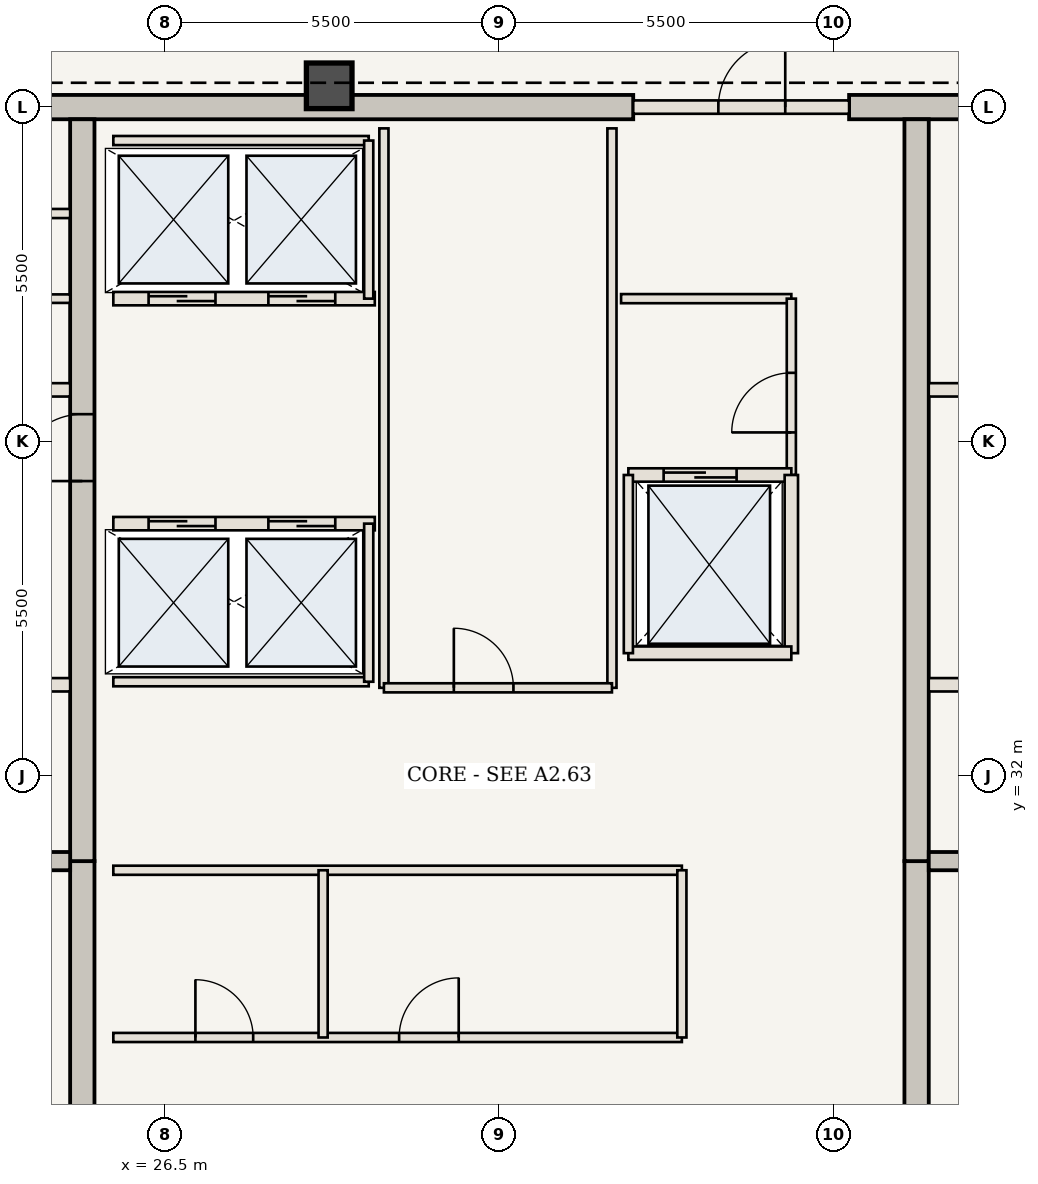
"""IFC4 building model, lengths in metres.
Left out: names, types, materials, properties, quantities, classifications, styles, units other than length and angle.
Written with IfcOpenShell. Run it as: python <this file> out.ifc"""

import sys

from ifc_helpers import new_model, si_unit, direction, frame, frame_2d, origin, origin_2d, place, context, subcontext, project, spatial, rectangle, extrude, element, fill, save


model = new_model("IFC4")
c1 = context("Model", 3, precision=1e-05, world=origin(), true_north=direction((0.0, 1.0)))
c2 = subcontext(c1, "Body", "Model", "MODEL_VIEW")
j1 = project(units=[si_unit("LENGTHUNIT", "METRE"), si_unit("PLANEANGLEUNIT", "RADIAN")], contexts=[c1])
p1 = place(None, origin())
s1 = spatial("IfcSite", under=j1, at=p1, CompositionType="ELEMENT")
p2 = place(p1, origin())
s2 = spatial("IfcBuilding", under=s1, at=p2, CompositionType="ELEMENT")
p3 = place(p2, frame((0.0, 0.0, 292.95)))
s3 = spatial("IfcBuildingStorey", under=s2, at=p3, CompositionType="ELEMENT", Elevation=292.95)
p4 = place(p3, frame((21.41, 43.0, 0.0), z_axis=(0.0, 0.0, 1.0), x_axis=(1.0, 0.0, 0.0)))
e1 = element("IfcWall", 1, at=p4, inside=s3, PredefinedType="SHEAR", context=c2, shape_type="SweptSolid", body=[
    extrude(rectangle(XDim=12.79, YDim=0.4, at=frame_2d((6.395, 0.0))), origin(), (0.0, 0.0, 1.0), 3.85),
])
p5 = place(p3, frame((37.75, 43.0, 0.0), z_axis=(0.0, 0.0, 1.0), x_axis=(1.0, 0.0, 0.0)))
e2 = element("IfcWall", 2, at=p5, inside=s3, PredefinedType="SHEAR", context=c2, shape_type="SweptSolid", body=[
    extrude(rectangle(XDim=4.84, YDim=0.4, at=frame_2d((2.42, 0.0))), origin(), (0.0, 0.0, 1.0), 3.85),
])
p6 = place(p3, frame((25.14, 21.15, 0.0), z_axis=(0.0, 0.0, 1.0), x_axis=(0.0, 1.0, 0.0)))
e3 = element("IfcWall", 3, at=p6, inside=s3, PredefinedType="SHEAR", context=c2, shape_type="SweptSolid", body=[
    extrude(rectangle(XDim=9.45, YDim=0.4, at=frame_2d((4.725, 0.0))), origin(), (0.0, 0.0, 1.0), 3.85),
])
p7 = place(p3, frame((25.14, 30.6, 0.0), z_axis=(0.0, 0.0, 1.0), x_axis=(0.0, 1.0, 0.0)))
e4 = element("IfcWall", 4, at=p7, inside=s3, PredefinedType="SHEAR", context=c2, shape_type="SweptSolid", body=[
    extrude(rectangle(XDim=12.2, YDim=0.4, at=frame_2d((6.1, 0.0))), origin(), (0.0, 0.0, 1.0), 3.85),
])
p8 = place(p7, frame((6.25, 0.0, 0.0)))
e5 = element("IfcOpeningElement", 5, at=p8, cuts=e4, PredefinedType="OPENING", context=c2, shape_type="SweptSolid", body=[
    extrude(rectangle(XDim=1.1, YDim=2.15, at=frame_2d((0.55, 1.075))), frame((0.0, 0.21, 0.0), z_axis=(0.0, -1.0, 0.0), x_axis=(1.0, 0.0, 0.0)), (0.0, 0.0, 1.0), 0.42),
])
p9 = place(p3, frame((38.86, 21.15, 0.0), z_axis=(0.0, 0.0, 1.0), x_axis=(0.0, 1.0, 0.0)))
e6 = element("IfcWall", 6, at=p9, inside=s3, PredefinedType="SHEAR", context=c2, shape_type="SweptSolid", body=[
    extrude(rectangle(XDim=9.45, YDim=0.4, at=frame_2d((4.725, 0.0))), origin(), (0.0, 0.0, 1.0), 3.85),
])
p10 = place(p3, frame((38.86, 30.6, 0.0), z_axis=(0.0, 0.0, 1.0), x_axis=(0.0, 1.0, 0.0)))
e7 = element("IfcWall", 7, at=p10, inside=s3, PredefinedType="SHEAR", context=c2, shape_type="SweptSolid", body=[
    extrude(rectangle(XDim=12.2, YDim=0.4, at=frame_2d((6.1, 0.0))), origin(), (0.0, 0.0, 1.0), 3.85),
])
p11 = place(p3, frame((29.2, 43.35, 0.0), z_axis=(0.0, 0.0, 1.0), x_axis=(1.0, 0.0, 0.0)))
e8 = element("IfcColumn", 8, at=p11, inside=s3, PredefinedType="COLUMN", context=c2, shape_type="SweptSolid", body=[
    extrude(rectangle(XDim=0.75, YDim=0.75, at=origin_2d()), origin(), (0.0, 0.0, 1.0), 3.85),
])
for number, where, z_axis, x_axis in (
    (9, (21.41, 30.6, 0.0), (0.0, 0.0, 1.0), (1.0, 0.0, 0.0)),
    (10, (39.06, 30.6, 0.0), (0.0, 0.0, 1.0), (1.0, 0.0, 0.0)),
):
    element("IfcWall", number, at=place(p3, frame(where, z_axis=z_axis, x_axis=x_axis)), inside=s3, PredefinedType="SHEAR", context=c2, shape_type="SweptSolid", body=[
        extrude(rectangle(XDim=3.53, YDim=0.3, at=frame_2d((1.765, 0.0))), origin(), (0.0, 0.0, 1.0), 3.685),
    ])
p12 = place(p3, frame((21.41, 33.5, 0.0), z_axis=(0.0, 0.0, 1.0), x_axis=(1.0, 0.0, 0.0)))
e11 = element("IfcWall", 11, at=p12, inside=s3, PredefinedType="STANDARD", context=c2, shape_type="SweptSolid", body=[
    extrude(rectangle(XDim=3.53, YDim=0.22, at=frame_2d((1.765, 0.0))), origin(), (0.0, 0.0, 1.0), 3.685),
])
p13 = place(p12, frame((0.75, 0.0, 0.0)))
e12 = element("IfcOpeningElement", 12, at=p13, cuts=e11, PredefinedType="OPENING", context=c2, shape_type="SweptSolid", body=[
    extrude(rectangle(XDim=1.2, YDim=2.2, at=frame_2d((0.6, 1.1))), frame((0.0, 0.12, 0.0), z_axis=(0.0, -1.0, 0.0), x_axis=(1.0, 0.0, 0.0)), (0.0, 0.0, 1.0), 0.24),
])
p14 = place(p3, frame((39.06, 33.5, 0.0), z_axis=(0.0, 0.0, 1.0), x_axis=(1.0, 0.0, 0.0)))
e13 = element("IfcWall", 13, at=p14, inside=s3, PredefinedType="STANDARD", context=c2, shape_type="SweptSolid", body=[
    extrude(rectangle(XDim=3.53, YDim=0.22, at=frame_2d((1.765, 0.0))), origin(), (0.0, 0.0, 1.0), 3.685),
])
p15 = place(p14, frame((1.55, 0.0, 0.0)))
e14 = element("IfcOpeningElement", 14, at=p15, cuts=e13, PredefinedType="OPENING", context=c2, shape_type="SweptSolid", body=[
    extrude(rectangle(XDim=1.2, YDim=2.2, at=frame_2d((0.6, 1.1))), frame((0.0, 0.12, 0.0), z_axis=(0.0, -1.0, 0.0), x_axis=(1.0, 0.0, 0.0)), (0.0, 0.0, 1.0), 0.24),
])
for number, where, z_axis, x_axis in (
    (15, (21.41, 38.35, 0.0), (0.0, 0.0, 1.0), (1.0, 0.0, 0.0)),
    (16, (39.06, 38.35, 0.0), (0.0, 0.0, 1.0), (1.0, 0.0, 0.0)),
):
    element("IfcWall", number, at=place(p3, frame(where, z_axis=z_axis, x_axis=x_axis)), inside=s3, PredefinedType="STANDARD", context=c2, shape_type="SweptSolid", body=[
        extrude(rectangle(XDim=3.53, YDim=0.22, at=frame_2d((1.765, 0.0))), origin(), (0.0, 0.0, 1.0), 3.685),
    ])
p16 = place(p3, frame((21.41, 39.85, 0.0), z_axis=(0.0, 0.0, 1.0), x_axis=(1.0, 0.0, 0.0)))
e17 = element("IfcWall", 17, at=p16, inside=s3, PredefinedType="STANDARD", context=c2, shape_type="SweptSolid", body=[
    extrude(rectangle(XDim=3.53, YDim=0.14, at=frame_2d((1.765, 0.0))), origin(), (0.0, 0.0, 1.0), 3.685),
])
p17 = place(p3, frame((21.41, 41.25, 0.0), z_axis=(0.0, 0.0, 1.0), x_axis=(1.0, 0.0, 0.0)))
e18 = element("IfcWall", 18, at=p17, inside=s3, PredefinedType="STANDARD", context=c2, shape_type="SweptSolid", body=[
    extrude(rectangle(XDim=3.53, YDim=0.15, at=frame_2d((1.765, 0.0))), origin(), (0.0, 0.0, 1.0), 3.685),
])
p18 = place(p3, frame((34.0, 39.85, 0.0), z_axis=(0.0, 0.0, 1.0), x_axis=(1.0, 0.0, 0.0)))
e19 = element("IfcWall", 19, at=p18, inside=s3, PredefinedType="STANDARD", context=c2, shape_type="SweptSolid", body=[
    extrude(rectangle(XDim=2.8, YDim=0.15, at=frame_2d((1.4, 0.0))), origin(), (0.0, 0.0, 1.0), 3.685),
])
p19 = place(p3, frame((36.8, 36.95, 0.0), z_axis=(0.0, 0.0, 1.0), x_axis=(0.0, 1.0, 0.0)))
e20 = element("IfcWall", 20, at=p19, inside=s3, PredefinedType="STANDARD", context=c2, shape_type="SweptSolid", body=[
    extrude(rectangle(XDim=2.9, YDim=0.15, at=frame_2d((1.45, 0.0))), origin(), (0.0, 0.0, 1.0), 3.685),
])
p20 = place(p19, frame((0.7, 0.0, 0.0)))
e21 = element("IfcOpeningElement", 21, at=p20, cuts=e20, PredefinedType="OPENING", context=c2, shape_type="SweptSolid", body=[
    extrude(rectangle(XDim=0.98, YDim=2.2, at=frame_2d((0.49, 1.1))), frame((0.0, 0.085, 0.0), z_axis=(0.0, -1.0, 0.0), x_axis=(1.0, 0.0, 0.0)), (0.0, 0.0, 1.0), 0.17),
])
p21 = place(p3, frame((25.65, 27.7, 0.0), z_axis=(0.0, 0.0, 1.0), x_axis=(1.0, 0.0, 0.0)))
e22 = element("IfcWall", 22, at=p21, inside=s3, PredefinedType="STANDARD", context=c2, shape_type="SweptSolid", body=[
    extrude(rectangle(XDim=9.35, YDim=0.15, at=frame_2d((4.675, 0.0))), origin(), (0.0, 0.0, 1.0), 3.685),
])
p22 = place(p21, frame((1.35, 0.0, 0.0)))
e23 = element("IfcOpeningElement", 23, at=p22, cuts=e22, PredefinedType="OPENING", context=c2, shape_type="SweptSolid", body=[
    extrude(rectangle(XDim=0.95, YDim=2.15, at=frame_2d((0.475, 1.075))), frame((0.0, 0.085, 0.0), z_axis=(0.0, -1.0, 0.0), x_axis=(1.0, 0.0, 0.0)), (0.0, 0.0, 1.0), 0.17),
])
p23 = place(p21, frame((4.7, 0.0, 0.0)))
e24 = element("IfcOpeningElement", 24, at=p23, cuts=e22, PredefinedType="OPENING", context=c2, shape_type="SweptSolid", body=[
    extrude(rectangle(XDim=0.98, YDim=2.2, at=frame_2d((0.49, 1.1))), frame((0.0, 0.085, 0.0), z_axis=(0.0, -1.0, 0.0), x_axis=(1.0, 0.0, 0.0)), (0.0, 0.0, 1.0), 0.17),
])
p24 = place(p3, frame((25.65, 30.45, 0.0), z_axis=(0.0, 0.0, 1.0), x_axis=(1.0, 0.0, 0.0)))
e25 = element("IfcWall", 25, at=p24, inside=s3, PredefinedType="STANDARD", context=c2, shape_type="SweptSolid", body=[
    extrude(rectangle(XDim=9.35, YDim=0.15, at=frame_2d((4.675, 0.0))), origin(), (0.0, 0.0, 1.0), 3.685),
])
for number, where, z_axis, x_axis in (
    (26, (29.1, 27.7, 0.0), (0.0, 0.0, 1.0), (0.0, 1.0, 0.0)),
    (27, (35.0, 27.7, 0.0), (0.0, 0.0, 1.0), (0.0, 1.0, 0.0)),
):
    element("IfcWall", number, at=place(p3, frame(where, z_axis=z_axis, x_axis=x_axis)), inside=s3, PredefinedType="STANDARD", context=c2, shape_type="SweptSolid", body=[
        extrude(rectangle(XDim=2.75, YDim=0.15, at=frame_2d((1.375, 0.0))), origin(), (0.0, 0.0, 1.0), 3.685),
    ])
p25 = place(p3, frame((25.65, 36.15, 0.0), z_axis=(0.0, 0.0, 1.0), x_axis=(1.0, 0.0, 0.0)))
e28 = element("IfcWall", 28, at=p25, inside=s3, PredefinedType="STANDARD", context=c2, shape_type="SweptSolid", body=[
    extrude(rectangle(XDim=4.3, YDim=0.22, at=frame_2d((2.15, 0.0))), origin(), (0.0, 0.0, 1.0), 3.685),
])
p26 = place(p25, frame((0.58, 0.0, 0.0)))
e29 = element("IfcOpeningElement", 29, at=p26, cuts=e28, PredefinedType="OPENING", context=c2, shape_type="SweptSolid", body=[
    extrude(rectangle(XDim=1.1, YDim=2.15, at=frame_2d((0.55, 1.075))), frame((0.0, 0.12, 0.0), z_axis=(0.0, -1.0, 0.0), x_axis=(1.0, 0.0, 0.0)), (0.0, 0.0, 1.0), 0.24),
])
p27 = place(p25, frame((2.55, 0.0, 0.0)))
e30 = element("IfcOpeningElement", 30, at=p27, cuts=e28, PredefinedType="OPENING", context=c2, shape_type="SweptSolid", body=[
    extrude(rectangle(XDim=1.1, YDim=2.15, at=frame_2d((0.55, 1.075))), frame((0.0, 0.12, 0.0), z_axis=(0.0, -1.0, 0.0), x_axis=(1.0, 0.0, 0.0)), (0.0, 0.0, 1.0), 0.24),
])
p28 = place(p3, frame((25.65, 33.55, 0.0), z_axis=(0.0, 0.0, 1.0), x_axis=(1.0, 0.0, 0.0)))
e31 = element("IfcWall", 31, at=p28, inside=s3, PredefinedType="STANDARD", context=c2, shape_type="SweptSolid", body=[
    extrude(rectangle(XDim=4.2, YDim=0.15, at=frame_2d((2.1, 0.0))), origin(), (0.0, 0.0, 1.0), 3.685),
])
p29 = place(p3, frame((29.85, 33.55, 0.0), z_axis=(0.0, 0.0, 1.0), x_axis=(0.0, 1.0, 0.0)))
e32 = element("IfcWall", 32, at=p29, inside=s3, PredefinedType="STANDARD", context=c2, shape_type="SweptSolid", body=[
    extrude(rectangle(XDim=2.6, YDim=0.15, at=frame_2d((1.3, 0.0))), origin(), (0.0, 0.0, 1.0), 3.685),
])
p30 = place(p3, frame((25.65, 39.85, 0.0), z_axis=(0.0, 0.0, 1.0), x_axis=(1.0, 0.0, 0.0)))
e33 = element("IfcWall", 33, at=p30, inside=s3, PredefinedType="STANDARD", context=c2, shape_type="SweptSolid", body=[
    extrude(rectangle(XDim=4.3, YDim=0.22, at=frame_2d((2.15, 0.0))), origin(), (0.0, 0.0, 1.0), 3.685),
])
p31 = place(p30, frame((0.58, 0.0, 0.0)))
e34 = element("IfcOpeningElement", 34, at=p31, cuts=e33, PredefinedType="OPENING", context=c2, shape_type="SweptSolid", body=[
    extrude(rectangle(XDim=1.1, YDim=2.15, at=frame_2d((0.55, 1.075))), frame((0.0, 0.12, 0.0), z_axis=(0.0, -1.0, 0.0), x_axis=(1.0, 0.0, 0.0)), (0.0, 0.0, 1.0), 0.24),
])
p32 = place(p30, frame((2.55, 0.0, 0.0)))
e35 = element("IfcOpeningElement", 35, at=p32, cuts=e33, PredefinedType="OPENING", context=c2, shape_type="SweptSolid", body=[
    extrude(rectangle(XDim=1.1, YDim=2.15, at=frame_2d((0.55, 1.075))), frame((0.0, 0.12, 0.0), z_axis=(0.0, -1.0, 0.0), x_axis=(1.0, 0.0, 0.0)), (0.0, 0.0, 1.0), 0.24),
])
p33 = place(p3, frame((25.65, 42.45, 0.0), z_axis=(0.0, 0.0, 1.0), x_axis=(1.0, 0.0, 0.0)))
e36 = element("IfcWall", 36, at=p33, inside=s3, PredefinedType="STANDARD", context=c2, shape_type="SweptSolid", body=[
    extrude(rectangle(XDim=4.2, YDim=0.15, at=frame_2d((2.1, 0.0))), origin(), (0.0, 0.0, 1.0), 3.685),
])
p34 = place(p3, frame((29.85, 39.85, 0.0), z_axis=(0.0, 0.0, 1.0), x_axis=(0.0, 1.0, 0.0)))
e37 = element("IfcWall", 37, at=p34, inside=s3, PredefinedType="STANDARD", context=c2, shape_type="SweptSolid", body=[
    extrude(rectangle(XDim=2.6, YDim=0.15, at=frame_2d((1.3, 0.0))), origin(), (0.0, 0.0, 1.0), 3.685),
])
for number, where, z_axis, x_axis in (
    (38, (30.1, 33.45, 0.0), (0.0, 0.0, 1.0), (0.0, 1.0, 0.0)),
    (39, (33.85, 33.45, 0.0), (0.0, 0.0, 1.0), (0.0, 1.0, 0.0)),
):
    element("IfcWall", number, at=place(p3, frame(where, z_axis=z_axis, x_axis=x_axis)), inside=s3, PredefinedType="STANDARD", context=c2, shape_type="SweptSolid", body=[
        extrude(rectangle(XDim=9.2, YDim=0.15, at=frame_2d((4.6, 0.0))), origin(), (0.0, 0.0, 1.0), 3.685),
    ])
p35 = place(p3, frame((30.1, 33.45, 0.0), z_axis=(0.0, 0.0, 1.0), x_axis=(1.0, 0.0, 0.0)))
e40 = element("IfcWall", 40, at=p35, inside=s3, PredefinedType="STANDARD", context=c2, shape_type="SweptSolid", body=[
    extrude(rectangle(XDim=3.75, YDim=0.15, at=frame_2d((1.875, 0.0))), origin(), (0.0, 0.0, 1.0), 3.685),
])
p36 = place(p35, frame((1.15, 0.0, 0.0)))
e41 = element("IfcOpeningElement", 41, at=p36, cuts=e40, PredefinedType="OPENING", context=c2, shape_type="SweptSolid", body=[
    extrude(rectangle(XDim=0.98, YDim=2.2, at=frame_2d((0.49, 1.1))), frame((0.0, 0.085, 0.0), z_axis=(0.0, -1.0, 0.0), x_axis=(1.0, 0.0, 0.0)), (0.0, 0.0, 1.0), 0.17),
])
p37 = place(p3, frame((34.2, 43.0, 0.0), z_axis=(0.0, 0.0, 1.0), x_axis=(1.0, 0.0, 0.0)))
e42 = element("IfcWall", 42, at=p37, inside=s3, PredefinedType="STANDARD", context=c2, shape_type="SweptSolid", body=[
    extrude(rectangle(XDim=3.55, YDim=0.22, at=frame_2d((1.775, 0.0))), origin(), (0.0, 0.0, 1.0), 3.685),
])
p38 = place(p37, frame((1.4, 0.0, 0.0)))
e43 = element("IfcOpeningElement", 43, at=p38, cuts=e42, PredefinedType="OPENING", context=c2, shape_type="SweptSolid", body=[
    extrude(rectangle(XDim=1.1, YDim=2.15, at=frame_2d((0.55, 1.075))), frame((0.0, 0.12, 0.0), z_axis=(0.0, -1.0, 0.0), x_axis=(1.0, 0.0, 0.0)), (0.0, 0.0, 1.0), 0.24),
])
p39 = place(p3, frame((34.12, 36.95, 0.0), z_axis=(0.0, 0.0, 1.0), x_axis=(1.0, 0.0, 0.0)))
e44 = element("IfcWall", 44, at=p39, inside=s3, PredefinedType="STANDARD", context=c2, shape_type="SweptSolid", body=[
    extrude(rectangle(XDim=2.68, YDim=0.22, at=frame_2d((1.34, 0.0))), origin(), (0.0, 0.0, 1.0), 3.685),
])
p40 = place(p39, frame((0.58, 0.0, 0.0)))
e45 = element("IfcOpeningElement", 45, at=p40, cuts=e44, PredefinedType="OPENING", context=c2, shape_type="SweptSolid", body=[
    extrude(rectangle(XDim=1.2, YDim=2.2, at=frame_2d((0.6, 1.1))), frame((0.0, 0.12, 0.0), z_axis=(0.0, -1.0, 0.0), x_axis=(1.0, 0.0, 0.0)), (0.0, 0.0, 1.0), 0.24),
])
p41 = place(p3, frame((36.8, 34.02, 0.0), z_axis=(0.0, 0.0, 1.0), x_axis=(0.0, 1.0, 0.0)))
e46 = element("IfcWall", 46, at=p41, inside=s3, PredefinedType="STANDARD", context=c2, shape_type="SweptSolid", body=[
    extrude(rectangle(XDim=2.93, YDim=0.22, at=frame_2d((1.465, 0.0))), origin(), (0.0, 0.0, 1.0), 3.685),
])
p42 = place(p3, frame((34.12, 34.02, 0.0), z_axis=(0.0, 0.0, 1.0), x_axis=(1.0, 0.0, 0.0)))
e47 = element("IfcWall", 47, at=p42, inside=s3, PredefinedType="STANDARD", context=c2, shape_type="SweptSolid", body=[
    extrude(rectangle(XDim=2.68, YDim=0.22, at=frame_2d((1.34, 0.0))), origin(), (0.0, 0.0, 1.0), 3.685),
])
p43 = place(p3, frame((34.12, 34.02, 0.0), z_axis=(0.0, 0.0, 1.0), x_axis=(0.0, 1.0, 0.0)))
e48 = element("IfcWall", 48, at=p43, inside=s3, PredefinedType="STANDARD", context=c2, shape_type="SweptSolid", body=[
    extrude(rectangle(XDim=2.93, YDim=0.15, at=frame_2d((1.465, 0.0))), origin(), (0.0, 0.0, 1.0), 3.685),
])
p44 = place(p8, origin())
e49 = element("IfcDoor", 49, at=p44, inside=s3, OperationType="SINGLE_SWING_LEFT", PredefinedType="DOOR", context=c2, shape_type="SweptSolid", body=[
    extrude(rectangle(XDim=1.1, YDim=2.15, at=frame_2d((0.55, 1.075))), frame((0.0, 0.025, 0.0), z_axis=(0.0, -1.0, 0.0), x_axis=(1.0, 0.0, 0.0)), (0.0, 0.0, 1.0), 0.05),
])
fill(e5, e49)
p45 = place(p20, origin())
e50 = element("IfcDoor", 50, at=p45, inside=s3, OperationType="SINGLE_SWING_LEFT", PredefinedType="DOOR", context=c2, shape_type="SweptSolid", body=[
    extrude(rectangle(XDim=0.98, YDim=2.2, at=frame_2d((0.49, 1.1))), frame((0.0, 0.025, 0.0), z_axis=(0.0, -1.0, 0.0), x_axis=(1.0, 0.0, 0.0)), (0.0, 0.0, 1.0), 0.05),
])
fill(e21, e50)
p46 = place(p22, origin())
e51 = element("IfcDoor", 51, at=p46, inside=s3, OperationType="SINGLE_SWING_LEFT", PredefinedType="DOOR", context=c2, shape_type="SweptSolid", body=[
    extrude(rectangle(XDim=0.95, YDim=2.15, at=frame_2d((0.475, 1.075))), frame((0.0, 0.025, 0.0), z_axis=(0.0, -1.0, 0.0), x_axis=(1.0, 0.0, 0.0)), (0.0, 0.0, 1.0), 0.05),
])
fill(e23, e51)
p47 = place(p23, origin())
e52 = element("IfcDoor", 52, at=p47, inside=s3, OperationType="SINGLE_SWING_RIGHT", PredefinedType="DOOR", context=c2, shape_type="SweptSolid", body=[
    extrude(rectangle(XDim=0.98, YDim=2.2, at=frame_2d((0.49, 1.1))), frame((0.0, 0.025, 0.0), z_axis=(0.0, -1.0, 0.0), x_axis=(1.0, 0.0, 0.0)), (0.0, 0.0, 1.0), 0.05),
])
fill(e24, e52)
p48 = place(p26, origin())
e53 = element("IfcDoor", 53, at=p48, inside=s3, OperationType="DOUBLE_DOOR_SLIDING", PredefinedType="DOOR", context=c2, shape_type="SweptSolid", body=[
    extrude(rectangle(XDim=1.1, YDim=2.15, at=frame_2d((0.55, 1.075))), frame((0.0, 0.025, 0.0), z_axis=(0.0, -1.0, 0.0), x_axis=(1.0, 0.0, 0.0)), (0.0, 0.0, 1.0), 0.05),
])
fill(e29, e53)
p49 = place(p27, origin())
e54 = element("IfcDoor", 54, at=p49, inside=s3, OperationType="DOUBLE_DOOR_SLIDING", PredefinedType="DOOR", context=c2, shape_type="SweptSolid", body=[
    extrude(rectangle(XDim=1.1, YDim=2.15, at=frame_2d((0.55, 1.075))), frame((0.0, 0.025, 0.0), z_axis=(0.0, -1.0, 0.0), x_axis=(1.0, 0.0, 0.0)), (0.0, 0.0, 1.0), 0.05),
])
fill(e30, e54)
p50 = place(p31, origin())
e55 = element("IfcDoor", 55, at=p50, inside=s3, OperationType="DOUBLE_DOOR_SLIDING", PredefinedType="DOOR", context=c2, shape_type="SweptSolid", body=[
    extrude(rectangle(XDim=1.1, YDim=2.15, at=frame_2d((0.55, 1.075))), frame((0.0, 0.025, 0.0), z_axis=(0.0, -1.0, 0.0), x_axis=(1.0, 0.0, 0.0)), (0.0, 0.0, 1.0), 0.05),
])
fill(e34, e55)
p51 = place(p32, origin())
e56 = element("IfcDoor", 56, at=p51, inside=s3, OperationType="DOUBLE_DOOR_SLIDING", PredefinedType="DOOR", context=c2, shape_type="SweptSolid", body=[
    extrude(rectangle(XDim=1.1, YDim=2.15, at=frame_2d((0.55, 1.075))), frame((0.0, 0.025, 0.0), z_axis=(0.0, -1.0, 0.0), x_axis=(1.0, 0.0, 0.0)), (0.0, 0.0, 1.0), 0.05),
])
fill(e35, e56)
p52 = place(p36, origin())
e57 = element("IfcDoor", 57, at=p52, inside=s3, OperationType="SINGLE_SWING_LEFT", PredefinedType="DOOR", context=c2, shape_type="SweptSolid", body=[
    extrude(rectangle(XDim=0.98, YDim=2.2, at=frame_2d((0.49, 1.1))), frame((0.0, 0.025, 0.0), z_axis=(0.0, -1.0, 0.0), x_axis=(1.0, 0.0, 0.0)), (0.0, 0.0, 1.0), 0.05),
])
fill(e41, e57)
p53 = place(p38, origin())
e58 = element("IfcDoor", 58, at=p53, inside=s3, OperationType="SINGLE_SWING_RIGHT", PredefinedType="DOOR", context=c2, shape_type="SweptSolid", body=[
    extrude(rectangle(XDim=1.1, YDim=2.15, at=frame_2d((0.55, 1.075))), frame((0.0, 0.025, 0.0), z_axis=(0.0, -1.0, 0.0), x_axis=(1.0, 0.0, 0.0)), (0.0, 0.0, 1.0), 0.05),
])
fill(e43, e58)
p54 = place(p40, origin())
e59 = element("IfcDoor", 59, at=p54, inside=s3, OperationType="DOUBLE_DOOR_SLIDING", PredefinedType="DOOR", context=c2, shape_type="SweptSolid", body=[
    extrude(rectangle(XDim=1.2, YDim=2.2, at=frame_2d((0.6, 1.1))), frame((0.0, 0.025, 0.0), z_axis=(0.0, -1.0, 0.0), x_axis=(1.0, 0.0, 0.0)), (0.0, 0.0, 1.0), 0.05),
])
fill(e45, e59)
save(model, sys.argv[1])
